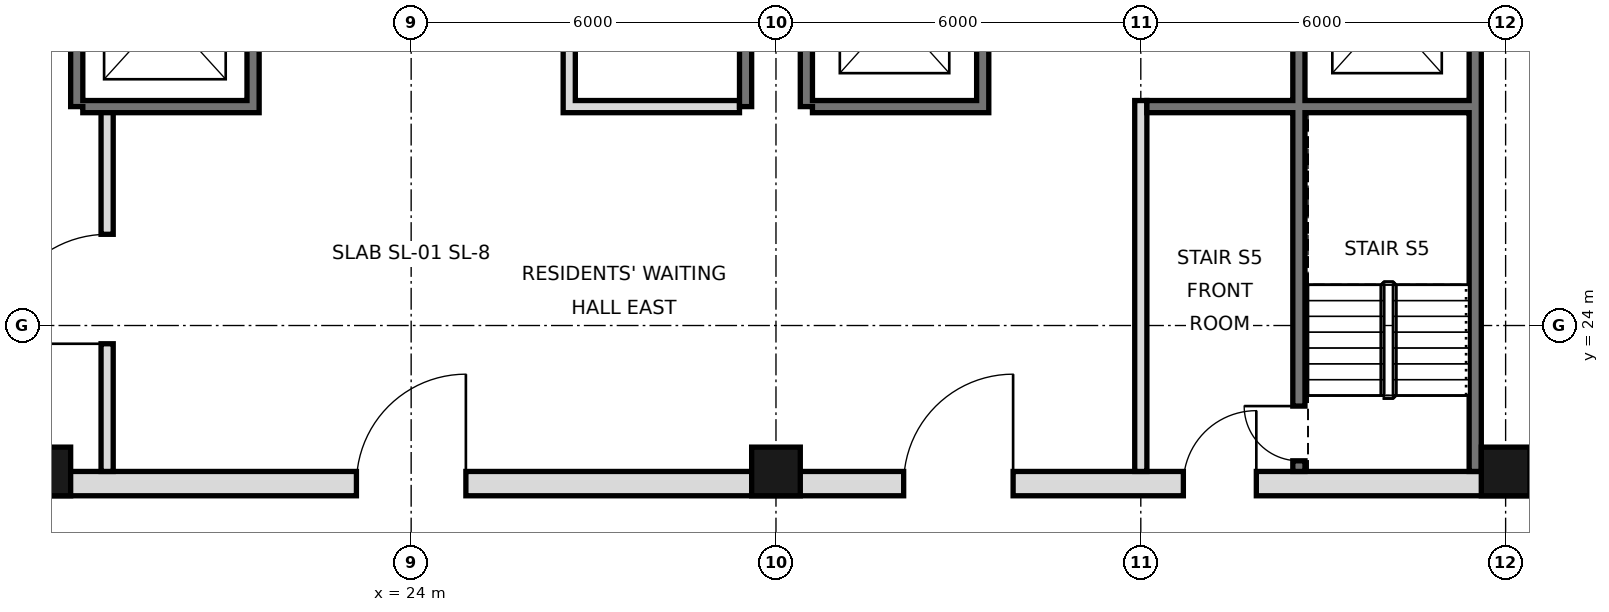
"""IFC4 building model, lengths in metres.
Left out: names, types, materials, properties, quantities, classifications, styles, units other than length and angle.
Written with IfcOpenShell. Run it as: python <this file> out.ifc"""

import sys

from ifc_helpers import new_model, si_unit, direction, frame, frame_2d, origin, origin_2d, place, context, subcontext, project, spatial, rectangle, hollow_rectangle, extrude, element, fill, save


model = new_model("IFC4")
c1 = context("Model", 3, precision=1e-05, world=origin(), true_north=direction((0.0, 1.0)))
c2 = subcontext(c1, "Body", "Model", "MODEL_VIEW")
j1 = project(units=[si_unit("LENGTHUNIT", "METRE"), si_unit("PLANEANGLEUNIT", "RADIAN")], contexts=[c1])
p1 = place(None, origin())
s1 = spatial("IfcSite", under=j1, at=p1, CompositionType="ELEMENT")
p2 = place(p1, origin())
s2 = spatial("IfcBuilding", under=s1, at=p2, CompositionType="ELEMENT")
p3 = place(p2, frame((0.0, 0.0, 210.0)))
s3 = spatial("IfcBuildingStorey", under=s2, at=p3, CompositionType="ELEMENT", Elevation=210.0)
for number, where, z_axis, x_axis in (
    (1, (18.0, 21.6, 0.0), (0.0, 0.0, 1.0), (1.0, 0.0, 0.0)),
    (2, (30.0, 21.6, 0.0), (0.0, 0.0, 1.0), (1.0, 0.0, 0.0)),
    (3, (42.0, 21.6, 0.0), (0.0, 0.0, 1.0), (1.0, 0.0, 0.0)),
):
    element("IfcColumn", number, at=place(p3, frame(where, z_axis=z_axis, x_axis=x_axis)), inside=s3, PredefinedType="COLUMN", context=c2, shape_type="SweptSolid", body=[
        extrude(hollow_rectangle(XDim=0.8, YDim=0.8, WallThickness=0.04, at=origin_2d()), origin(), (0.0, 0.0, 1.0), 5.4),
    ])
p4 = place(p3, frame((41.5, 21.6, 0.0), z_axis=(0.0, 0.0, 1.0), x_axis=(0.0, 1.0, 0.0)))
e4 = element("IfcWall", 4, at=p4, inside=s3, PredefinedType="SOLIDWALL", context=c2, shape_type="SweptSolid", body=[
    extrude(rectangle(XDim=23.5, YDim=0.2, at=frame_2d((11.75, 0.0))), origin(), (0.0, 0.0, 1.0), 5.22),
])
for number, where, z_axis, x_axis in (
    (5, (18.5, 27.6, 0.0), (0.0, 0.0, 1.0), (0.0, 1.0, 0.0)),
    (6, (29.5, 27.6, 0.0), (0.0, 0.0, 1.0), (0.0, 1.0, 0.0)),
    (7, (30.5, 27.6, 0.0), (0.0, 0.0, 1.0), (0.0, 1.0, 0.0)),
):
    element("IfcWall", number, at=place(p3, frame(where, z_axis=z_axis, x_axis=x_axis)), inside=s3, PredefinedType="SOLIDWALL", context=c2, shape_type="SweptSolid", body=[
        extrude(rectangle(XDim=17.5, YDim=0.2, at=frame_2d((8.75, 0.0))), origin(), (0.0, 0.0, 1.0), 5.22),
    ])
p5 = place(p3, frame((5.6, 21.4, 0.0), z_axis=(0.0, 0.0, 1.0), x_axis=(1.0, 0.0, 0.0)))
e8 = element("IfcWall", 8, at=p5, inside=s3, PredefinedType="SOLIDWALL", context=c2, shape_type="SweptSolid", body=[
    extrude(rectangle(XDim=36.8, YDim=0.4, at=frame_2d((18.4, 0.0))), origin(), (0.0, 0.0, 1.0), 5.22),
])
p6 = place(p5, frame((8.5, 0.0, 0.0)))
e9 = element("IfcOpeningElement", 9, at=p6, cuts=e8, PredefinedType="OPENING", context=c2, shape_type="SweptSolid", body=[
    extrude(rectangle(XDim=1.8, YDim=2.1, at=frame_2d((0.9, 1.05))), frame((0.0, 0.21, 0.0), z_axis=(0.0, -1.0, 0.0), x_axis=(1.0, 0.0, 0.0)), (0.0, 0.0, 1.0), 0.42),
])
p7 = place(p5, frame((17.5, 0.0, 0.0)))
e10 = element("IfcOpeningElement", 10, at=p7, cuts=e8, PredefinedType="OPENING", context=c2, shape_type="SweptSolid", body=[
    extrude(rectangle(XDim=1.8, YDim=2.1, at=frame_2d((0.9, 1.05))), frame((0.0, 0.21, 0.0), z_axis=(0.0, -1.0, 0.0), x_axis=(1.0, 0.0, 0.0)), (0.0, 0.0, 1.0), 0.42),
])
p8 = place(p5, frame((26.5, 0.0, 0.0)))
e11 = element("IfcOpeningElement", 11, at=p8, cuts=e8, PredefinedType="OPENING", context=c2, shape_type="SweptSolid", body=[
    extrude(rectangle(XDim=1.8, YDim=2.1, at=frame_2d((0.9, 1.05))), frame((0.0, 0.21, 0.0), z_axis=(0.0, -1.0, 0.0), x_axis=(1.0, 0.0, 0.0)), (0.0, 0.0, 1.0), 0.42),
])
p9 = place(p5, frame((4.5, 0.0, 0.0)))
e12 = element("IfcOpeningElement", 12, at=p9, cuts=e8, PredefinedType="OPENING", context=c2, shape_type="SweptSolid", body=[
    extrude(rectangle(XDim=1.2, YDim=2.1, at=frame_2d((0.6, 1.05))), frame((0.0, 0.21, 0.0), z_axis=(0.0, -1.0, 0.0), x_axis=(1.0, 0.0, 0.0)), (0.0, 0.0, 1.0), 0.42),
])
p10 = place(p5, frame((31.1, 0.0, 0.0)))
e13 = element("IfcOpeningElement", 13, at=p10, cuts=e8, PredefinedType="OPENING", context=c2, shape_type="SweptSolid", body=[
    extrude(rectangle(XDim=1.2, YDim=2.1, at=frame_2d((0.6, 1.05))), frame((0.0, 0.21, 0.0), z_axis=(0.0, -1.0, 0.0), x_axis=(1.0, 0.0, 0.0)), (0.0, 0.0, 1.0), 0.42),
])
p11 = place(p3, frame((19.0, 21.6, 0.0), z_axis=(0.0, 0.0, 1.0), x_axis=(0.0, 1.0, 0.0)))
e14 = element("IfcWall", 14, at=p11, inside=s3, PredefinedType="PARTITIONING", context=c2, shape_type="SweptSolid", body=[
    extrude(rectangle(XDim=6.0, YDim=0.2, at=frame_2d((3.0, 0.0))), origin(), (0.0, 0.0, 1.0), 5.22),
])
p12 = place(p11, frame((2.1, 0.0, 0.0)))
e15 = element("IfcOpeningElement", 15, at=p12, cuts=e14, PredefinedType="OPENING", context=c2, shape_type="SweptSolid", body=[
    extrude(rectangle(XDim=1.8, YDim=2.1, at=frame_2d((0.9, 1.05))), frame((0.0, 0.11, 0.0), z_axis=(0.0, -1.0, 0.0), x_axis=(1.0, 0.0, 0.0)), (0.0, 0.0, 1.0), 0.22),
])
p13 = place(p3, frame((21.4, 27.5, 0.0), z_axis=(0.0, 0.0, 1.0), x_axis=(0.0, 1.0, 0.0)))
e16 = element("IfcWall", 16, at=p13, inside=s3, PredefinedType="SOLIDWALL", context=c2, shape_type="SweptSolid", body=[
    extrude(rectangle(XDim=17.5, YDim=0.2, at=frame_2d((8.75, 0.0))), origin(), (0.0, 0.0, 1.0), 5.22),
])
p14 = place(p13, frame((1.1, 0.0, 0.0)))
e17 = element("IfcOpeningElement", 17, at=p14, cuts=e16, PredefinedType="OPENING", context=c2, shape_type="SweptSolid", body=[
    extrude(rectangle(XDim=1.1, YDim=2.1, at=frame_2d((0.55, 1.05))), frame((0.0, 0.11, 0.0), z_axis=(0.0, -1.0, 0.0), x_axis=(1.0, 0.0, 0.0)), (0.0, 0.0, 1.0), 0.22),
])
p15 = place(p13, frame((4.2, 0.0, 0.0)))
e18 = element("IfcOpeningElement", 18, at=p15, cuts=e16, PredefinedType="OPENING", context=c2, shape_type="SweptSolid", body=[
    extrude(rectangle(XDim=1.1, YDim=2.1, at=frame_2d((0.55, 1.05))), frame((0.0, 0.11, 0.0), z_axis=(0.0, -1.0, 0.0), x_axis=(1.0, 0.0, 0.0)), (0.0, 0.0, 1.0), 0.22),
])
p16 = place(p13, frame((16.2, 0.0, 0.0)))
e19 = element("IfcOpeningElement", 19, at=p16, cuts=e16, PredefinedType="OPENING", context=c2, shape_type="SweptSolid", body=[
    extrude(rectangle(XDim=1.0, YDim=2.1, at=frame_2d((0.5, 1.05))), frame((0.0, 0.11, 0.0), z_axis=(0.0, -1.0, 0.0), x_axis=(1.0, 0.0, 0.0)), (0.0, 0.0, 1.0), 0.22),
])
p17 = place(p13, frame((7.4, 0.0, 0.0)))
e20 = element("IfcOpeningElement", 20, at=p17, cuts=e16, PredefinedType="OPENING", context=c2, shape_type="SweptSolid", body=[
    extrude(rectangle(XDim=0.9, YDim=2.1, at=frame_2d((0.45, 1.05))), frame((0.0, 0.11, 0.0), z_axis=(0.0, -1.0, 0.0), x_axis=(1.0, 0.0, 0.0)), (0.0, 0.0, 1.0), 0.22),
])
p18 = place(p3, frame((26.6, 27.5, 0.0), z_axis=(0.0, 0.0, 1.0), x_axis=(0.0, 1.0, 0.0)))
e21 = element("IfcWall", 21, at=p18, inside=s3, PredefinedType="SOLIDWALL", context=c2, shape_type="SweptSolid", body=[
    extrude(rectangle(XDim=17.5, YDim=0.2, at=frame_2d((8.75, 0.0))), origin(), (0.0, 0.0, 1.0), 5.22),
])
p19 = place(p18, frame((4.3, 0.0, 0.0)))
e22 = element("IfcOpeningElement", 22, at=p19, cuts=e21, PredefinedType="OPENING", context=c2, shape_type="SweptSolid", body=[
    extrude(rectangle(XDim=0.9, YDim=2.1, at=frame_2d((0.45, 1.05))), frame((0.0, 0.11, 0.0), z_axis=(0.0, -1.0, 0.0), x_axis=(1.0, 0.0, 0.0)), (0.0, 0.0, 1.0), 0.22),
])
p20 = place(p18, frame((10.35, 0.0, 0.0)))
e23 = element("IfcOpeningElement", 23, at=p20, cuts=e21, PredefinedType="OPENING", context=c2, shape_type="SweptSolid", body=[
    extrude(rectangle(XDim=1.0, YDim=2.1, at=frame_2d((0.5, 1.05))), frame((0.0, 0.11, 0.0), z_axis=(0.0, -1.0, 0.0), x_axis=(1.0, 0.0, 0.0)), (0.0, 0.0, 1.0), 0.22),
])
p21 = place(p3, frame((33.4, 27.5, 0.0), z_axis=(0.0, 0.0, 1.0), x_axis=(0.0, 1.0, 0.0)))
e24 = element("IfcWall", 24, at=p21, inside=s3, PredefinedType="SOLIDWALL", context=c2, shape_type="SweptSolid", body=[
    extrude(rectangle(XDim=17.5, YDim=0.2, at=frame_2d((8.75, 0.0))), origin(), (0.0, 0.0, 1.0), 5.22),
])
p22 = place(p21, frame((1.1, 0.0, 0.0)))
e25 = element("IfcOpeningElement", 25, at=p22, cuts=e24, PredefinedType="OPENING", context=c2, shape_type="SweptSolid", body=[
    extrude(rectangle(XDim=1.1, YDim=2.1, at=frame_2d((0.55, 1.05))), frame((0.0, 0.11, 0.0), z_axis=(0.0, -1.0, 0.0), x_axis=(1.0, 0.0, 0.0)), (0.0, 0.0, 1.0), 0.22),
])
p23 = place(p21, frame((4.2, 0.0, 0.0)))
e26 = element("IfcOpeningElement", 26, at=p23, cuts=e24, PredefinedType="OPENING", context=c2, shape_type="SweptSolid", body=[
    extrude(rectangle(XDim=1.1, YDim=2.1, at=frame_2d((0.55, 1.05))), frame((0.0, 0.11, 0.0), z_axis=(0.0, -1.0, 0.0), x_axis=(1.0, 0.0, 0.0)), (0.0, 0.0, 1.0), 0.22),
])
p24 = place(p21, frame((15.4, 0.0, 0.0)))
e27 = element("IfcOpeningElement", 27, at=p24, cuts=e24, PredefinedType="OPENING", context=c2, shape_type="SweptSolid", body=[
    extrude(rectangle(XDim=1.1, YDim=2.1, at=frame_2d((0.55, 1.05))), frame((0.0, 0.11, 0.0), z_axis=(0.0, -1.0, 0.0), x_axis=(1.0, 0.0, 0.0)), (0.0, 0.0, 1.0), 0.22),
])
p25 = place(p21, frame((9.9, 0.0, 0.0)))
e28 = element("IfcOpeningElement", 28, at=p25, cuts=e24, PredefinedType="OPENING", context=c2, shape_type="SweptSolid", body=[
    extrude(rectangle(XDim=0.9, YDim=2.1, at=frame_2d((0.45, 1.05))), frame((0.0, 0.11, 0.0), z_axis=(0.0, -1.0, 0.0), x_axis=(1.0, 0.0, 0.0)), (0.0, 0.0, 1.0), 0.22),
])
p26 = place(p3, frame((36.0, 21.6, 0.0), z_axis=(0.0, 0.0, 1.0), x_axis=(0.0, 1.0, 0.0)))
e29 = element("IfcWall", 29, at=p26, inside=s3, PredefinedType="PARTITIONING", context=c2, shape_type="SweptSolid", body=[
    extrude(rectangle(XDim=6.1, YDim=0.2, at=frame_2d((3.05, 0.0))), origin(), (0.0, 0.0, 1.0), 5.22),
])
p27 = place(p3, frame((38.6, 21.6, 0.0), z_axis=(0.0, 0.0, 1.0), x_axis=(0.0, 1.0, 0.0)))
e30 = element("IfcWall", 30, at=p27, inside=s3, PredefinedType="SOLIDWALL", context=c2, shape_type="SweptSolid", body=[
    extrude(rectangle(XDim=23.4, YDim=0.2, at=frame_2d((11.7, 0.0))), origin(), (0.0, 0.0, 1.0), 5.22),
])
p28 = place(p27, frame((7.0, 0.0, 0.0)))
e31 = element("IfcOpeningElement", 31, at=p28, cuts=e30, PredefinedType="OPENING", context=c2, shape_type="SweptSolid", body=[
    extrude(rectangle(XDim=1.1, YDim=2.1, at=frame_2d((0.55, 1.05))), frame((0.0, 0.11, 0.0), z_axis=(0.0, -1.0, 0.0), x_axis=(1.0, 0.0, 0.0)), (0.0, 0.0, 1.0), 0.22),
])
p29 = place(p27, frame((10.1, 0.0, 0.0)))
e32 = element("IfcOpeningElement", 32, at=p29, cuts=e30, PredefinedType="OPENING", context=c2, shape_type="SweptSolid", body=[
    extrude(rectangle(XDim=1.1, YDim=2.1, at=frame_2d((0.55, 1.05))), frame((0.0, 0.11, 0.0), z_axis=(0.0, -1.0, 0.0), x_axis=(1.0, 0.0, 0.0)), (0.0, 0.0, 1.0), 0.22),
])
p30 = place(p27, frame((13.2, 0.0, 0.0)))
e33 = element("IfcOpeningElement", 33, at=p30, cuts=e30, PredefinedType="OPENING", context=c2, shape_type="SweptSolid", body=[
    extrude(rectangle(XDim=1.1, YDim=2.1, at=frame_2d((0.55, 1.05))), frame((0.0, 0.11, 0.0), z_axis=(0.0, -1.0, 0.0), x_axis=(1.0, 0.0, 0.0)), (0.0, 0.0, 1.0), 0.22),
])
p31 = place(p27, frame((22.1, 0.0, 0.0)))
e34 = element("IfcOpeningElement", 34, at=p31, cuts=e30, PredefinedType="OPENING", context=c2, shape_type="SweptSolid", body=[
    extrude(rectangle(XDim=1.0, YDim=2.1, at=frame_2d((0.5, 1.05))), frame((0.0, 0.11, 0.0), z_axis=(0.0, -1.0, 0.0), x_axis=(1.0, 0.0, 0.0)), (0.0, 0.0, 1.0), 0.22),
])
p32 = place(p27, frame((0.175, 0.0, 0.0)))
e35 = element("IfcOpeningElement", 35, at=p32, cuts=e30, PredefinedType="OPENING", context=c2, shape_type="SweptSolid", body=[
    extrude(rectangle(XDim=0.9, YDim=2.1, at=frame_2d((0.45, 1.05))), frame((0.0, 0.11, 0.0), z_axis=(0.0, -1.0, 0.0), x_axis=(1.0, 0.0, 0.0)), (0.0, 0.0, 1.0), 0.22),
])
for number, where, z_axis, x_axis in (
    (36, (18.6, 27.6, 0.0), (0.0, 0.0, 1.0), (1.0, 0.0, 0.0)),
    (37, (26.7, 27.6, 0.0), (0.0, 0.0, 1.0), (1.0, 0.0, 0.0)),
    (38, (30.6, 27.6, 0.0), (0.0, 0.0, 1.0), (1.0, 0.0, 0.0)),
):
    element("IfcWall", number, at=place(p3, frame(where, z_axis=z_axis, x_axis=x_axis)), inside=s3, PredefinedType="SOLIDWALL", context=c2, shape_type="SweptSolid", body=[
        extrude(rectangle(XDim=2.7, YDim=0.2, at=frame_2d((1.35, 0.0))), origin(), (0.0, 0.0, 1.0), 5.22),
    ])
p33 = place(p3, frame((36.1, 27.6, 0.0), z_axis=(0.0, 0.0, 1.0), x_axis=(1.0, 0.0, 0.0)))
e39 = element("IfcWall", 39, at=p33, inside=s3, PredefinedType="SOLIDWALL", context=c2, shape_type="SweptSolid", body=[
    extrude(rectangle(XDim=5.3, YDim=0.2, at=frame_2d((2.65, 0.0))), origin(), (0.0, 0.0, 1.0), 5.22),
])
p34 = place(p12, origin())
e40 = element("IfcDoor", 40, at=p34, inside=s3, OperationType="SINGLE_SWING_LEFT", PredefinedType="DOOR", context=c2, shape_type="SweptSolid", body=[
    extrude(rectangle(XDim=1.8, YDim=2.1, at=frame_2d((0.9, 1.05))), frame((0.0, 0.025, 0.0), z_axis=(0.0, -1.0, 0.0), x_axis=(1.0, 0.0, 0.0)), (0.0, 0.0, 1.0), 0.05),
])
fill(e15, e40)
p35 = place(p7, frame((1.8, 0.0, 0.0), z_axis=(0.0, 0.0, 1.0), x_axis=(-1.0, 0.0, 0.0)))
e41 = element("IfcDoor", 41, at=p35, inside=s3, OperationType="SINGLE_SWING_LEFT", PredefinedType="DOOR", context=c2, shape_type="SweptSolid", body=[
    extrude(rectangle(XDim=1.8, YDim=2.1, at=frame_2d((0.9, 1.05))), frame((0.0, 0.025, 0.0), z_axis=(0.0, -1.0, 0.0), x_axis=(1.0, 0.0, 0.0)), (0.0, 0.0, 1.0), 0.05),
])
fill(e10, e41)
p36 = place(p8, frame((1.8, 0.0, 0.0), z_axis=(0.0, 0.0, 1.0), x_axis=(-1.0, 0.0, 0.0)))
e42 = element("IfcDoor", 42, at=p36, inside=s3, OperationType="SINGLE_SWING_LEFT", PredefinedType="DOOR", context=c2, shape_type="SweptSolid", body=[
    extrude(rectangle(XDim=1.8, YDim=2.1, at=frame_2d((0.9, 1.05))), frame((0.0, 0.025, 0.0), z_axis=(0.0, -1.0, 0.0), x_axis=(1.0, 0.0, 0.0)), (0.0, 0.0, 1.0), 0.05),
])
fill(e11, e42)
p37 = place(p10, frame((1.2, 0.0, 0.0), z_axis=(0.0, 0.0, 1.0), x_axis=(-1.0, 0.0, 0.0)))
e43 = element("IfcDoor", 43, at=p37, inside=s3, OperationType="SINGLE_SWING_LEFT", PredefinedType="DOOR", context=c2, shape_type="SweptSolid", body=[
    extrude(rectangle(XDim=1.2, YDim=2.1, at=frame_2d((0.6, 1.05))), frame((0.0, 0.025, 0.0), z_axis=(0.0, -1.0, 0.0), x_axis=(1.0, 0.0, 0.0)), (0.0, 0.0, 1.0), 0.05),
])
fill(e13, e43)
p38 = place(p32, frame((0.9, 0.0, 0.0), z_axis=(0.0, 0.0, 1.0), x_axis=(-1.0, 0.0, 0.0)))
e44 = element("IfcDoor", 44, at=p38, inside=s3, OperationType="SINGLE_SWING_LEFT", PredefinedType="DOOR", context=c2, shape_type="SweptSolid", body=[
    extrude(rectangle(XDim=0.9, YDim=2.1, at=frame_2d((0.45, 1.05))), frame((0.0, 0.025, 0.0), z_axis=(0.0, -1.0, 0.0), x_axis=(1.0, 0.0, 0.0)), (0.0, 0.0, 1.0), 0.05),
])
fill(e35, e44)
save(model, sys.argv[1])
